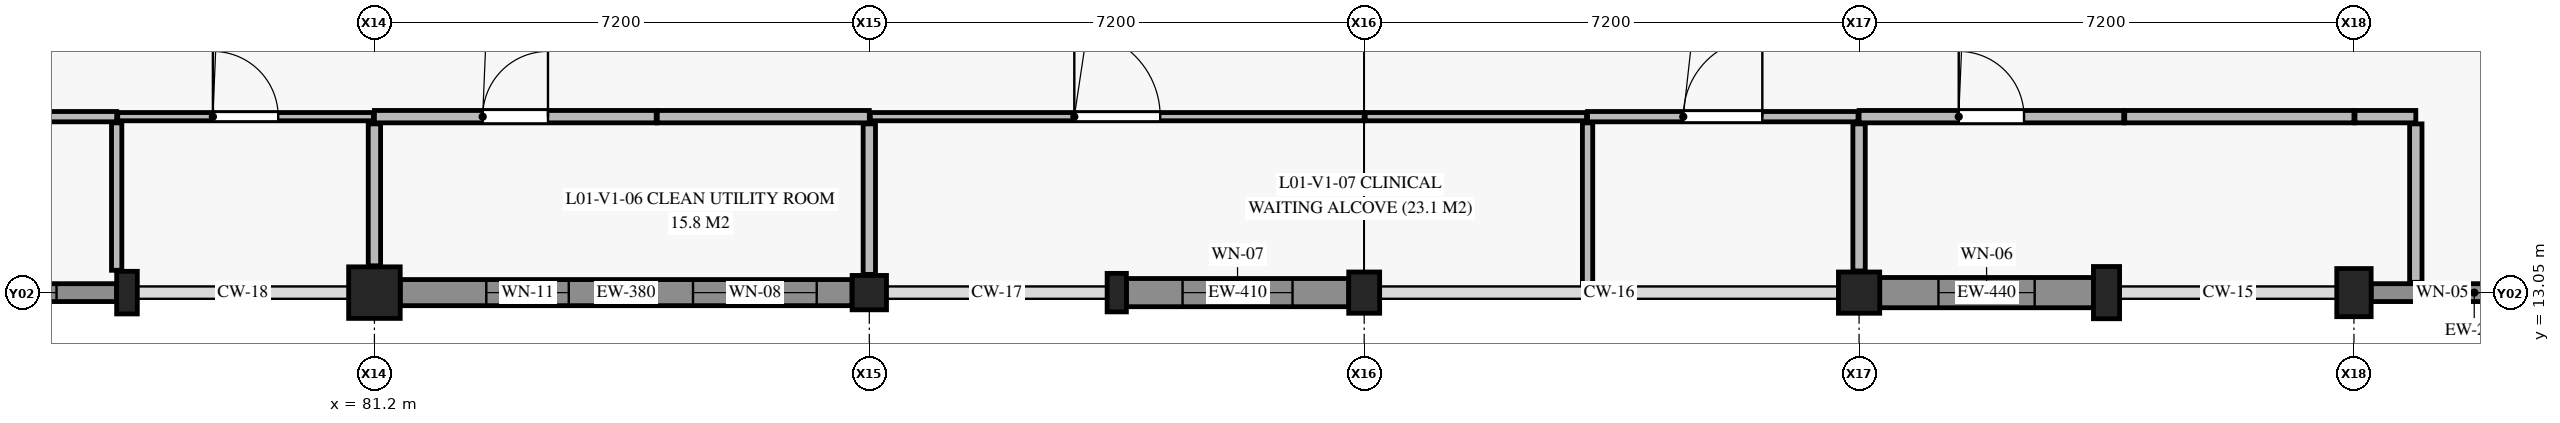
"""IFC4 building model, lengths in metres.
Left out: names, types, materials, properties, quantities, classifications, styles, units other than length and angle.
Written with IfcOpenShell. Run it as: python <this file> out.ifc"""

import sys

from ifc_helpers import new_model, si_unit, direction, frame, frame_2d, origin, origin_2d, place, context, subcontext, project, spatial, rectangle, extrude, element, fill, save


model = new_model("IFC4")
c1 = context("Model", 3, precision=1e-05, world=origin(), true_north=direction((0.0, 1.0)))
c2 = subcontext(c1, "Body", "Model", "MODEL_VIEW")
j1 = project(units=[si_unit("LENGTHUNIT", "METRE"), si_unit("PLANEANGLEUNIT", "RADIAN")], contexts=[c1])
p1 = place(None, origin())
s1 = spatial("IfcSite", under=j1, at=p1, CompositionType="ELEMENT")
p2 = place(p1, origin())
s2 = spatial("IfcBuilding", under=s1, at=p2, CompositionType="ELEMENT")
p3 = place(p2, frame((0.0, 0.0, 4.8)))
s3 = spatial("IfcBuildingStorey", under=s2, at=p3, CompositionType="ELEMENT", Elevation=4.8)
p4 = place(p3, frame((81.2, 13.05, 0.0), z_axis=(0.0, 0.0, 1.0), x_axis=(1.0, 0.0, 0.0)))
e1 = element("IfcColumn", 1, at=p4, inside=s3, PredefinedType="COLUMN", context=c2, shape_type="SweptSolid", body=[
    extrude(rectangle(XDim=0.75, YDim=0.75, at=origin_2d()), origin(), (0.0, 0.0, 1.0), 4.36),
])
p5 = place(p3, frame((88.4, 13.05, 0.0), z_axis=(0.0, 0.0, 1.0), x_axis=(1.0, 0.0, 0.0)))
e2 = element("IfcColumn", 2, at=p5, inside=s3, PredefinedType="COLUMN", context=c2, shape_type="SweptSolid", body=[
    extrude(rectangle(XDim=0.5, YDim=0.5, at=origin_2d()), origin(), (0.0, 0.0, 1.0), 4.36),
])
p6 = place(p3, frame((95.6, 13.05, 0.0), z_axis=(0.0, 0.0, 1.0), x_axis=(1.0, 0.0, 0.0)))
e3 = element("IfcColumn", 3, at=p6, inside=s3, PredefinedType="COLUMN", context=c2, shape_type="SweptSolid", body=[
    extrude(rectangle(XDim=0.45, YDim=0.6, at=origin_2d()), origin(), (0.0, 0.0, 1.0), 4.36),
])
p7 = place(p3, frame((102.8, 13.05, 0.0), z_axis=(0.0, 0.0, 1.0), x_axis=(1.0, 0.0, 0.0)))
e4 = element("IfcColumn", 4, at=p7, inside=s3, PredefinedType="COLUMN", context=c2, shape_type="SweptSolid", body=[
    extrude(rectangle(XDim=0.6, YDim=0.6, at=origin_2d()), origin(), (0.0, 0.0, 1.0), 4.36),
])
p8 = place(p3, frame((110.0, 13.05, 0.0), z_axis=(0.0, 0.0, 1.0), x_axis=(1.0, 0.0, 0.0)))
e5 = element("IfcColumn", 5, at=p8, inside=s3, PredefinedType="COLUMN", context=c2, shape_type="SweptSolid", body=[
    extrude(rectangle(XDim=0.5, YDim=0.7, at=origin_2d()), origin(), (0.0, 0.0, 1.0), 4.36),
])
p9 = place(p3, frame((77.6, 13.05, 0.0), z_axis=(0.0, 0.0, 1.0), x_axis=(1.0, 0.0, 0.0)))
e6 = element("IfcColumn", 6, at=p9, inside=s3, PredefinedType="PILASTER", context=c2, shape_type="SweptSolid", body=[
    extrude(rectangle(XDim=0.3, YDim=0.62, at=origin_2d()), origin(), (0.0, 0.0, 1.0), 4.2),
])
p10 = place(p3, frame((92.0, 13.05, 0.0), z_axis=(0.0, 0.0, 1.0), x_axis=(1.0, 0.0, 0.0)))
e7 = element("IfcColumn", 7, at=p10, inside=s3, PredefinedType="PILASTER", context=c2, shape_type="SweptSolid", body=[
    extrude(rectangle(XDim=0.28, YDim=0.56, at=origin_2d()), origin(), (0.0, 0.0, 1.0), 4.2),
])
p11 = place(p3, frame((106.4, 13.05, 0.0), z_axis=(0.0, 0.0, 1.0), x_axis=(1.0, 0.0, 0.0)))
e8 = element("IfcColumn", 8, at=p11, inside=s3, PredefinedType="PILASTER", context=c2, shape_type="SweptSolid", body=[
    extrude(rectangle(XDim=0.38, YDim=0.76, at=origin_2d()), origin(), (0.0, 0.0, 1.0), 4.2),
])
p12 = place(p3, frame((113.25, 13.05, 0.0), z_axis=(0.0, 0.0, 1.0), x_axis=(-1.0, 0.0, 0.0)))
e9 = element("IfcWall", 9, at=p12, inside=s3, PredefinedType="SOLIDWALL", context=c2, shape_type="SweptSolid", body=[
    extrude(rectangle(XDim=3.0, YDim=0.26, at=frame_2d((1.5, 0.0))), origin(), (0.0, 0.0, 1.0), 3.38),
])
p13 = place(p12, frame((0.565, 0.0, 0.9)))
e10 = element("IfcOpeningElement", 10, at=p13, cuts=e9, PredefinedType="OPENING", context=c2, shape_type="SweptSolid", body=[
    extrude(rectangle(XDim=1.2, YDim=1.8, at=frame_2d((0.6, 0.9))), frame((0.0, 0.14, 0.0), z_axis=(0.0, -1.0, 0.0), x_axis=(1.0, 0.0, 0.0)), (0.0, 0.0, 1.0), 0.28),
])
p14 = place(p3, frame((106.21, 13.05, 0.0), z_axis=(0.0, 0.0, 1.0), x_axis=(-1.0, 0.0, 0.0)))
e11 = element("IfcWall", 11, at=p14, inside=s3, PredefinedType="USERDEFINED", context=c2, shape_type="SweptSolid", body=[
    extrude(rectangle(XDim=3.11, YDim=0.44, at=frame_2d((1.555, 0.0))), origin(), (0.0, 0.0, 1.0), 3.38),
])
p15 = place(p14, frame((0.855, 0.0, 0.9)))
e12 = element("IfcOpeningElement", 12, at=p15, cuts=e11, PredefinedType="OPENING", context=c2, shape_type="SweptSolid", body=[
    extrude(rectangle(XDim=1.4, YDim=1.8, at=frame_2d((0.7, 0.9))), frame((0.0, 0.23, 0.0), z_axis=(0.0, -1.0, 0.0), x_axis=(1.0, 0.0, 0.0)), (0.0, 0.0, 1.0), 0.46),
])
p16 = place(p3, frame((95.375, 13.05, 0.0), z_axis=(0.0, 0.0, 1.0), x_axis=(-1.0, 0.0, 0.0)))
e13 = element("IfcWall", 13, at=p16, inside=s3, PredefinedType="USERDEFINED", context=c2, shape_type="SweptSolid", body=[
    extrude(rectangle(XDim=3.235, YDim=0.41, at=frame_2d((1.618, 0.0))), origin(), (0.0, 0.0, 1.0), 3.3),
])
p17 = place(p16, frame((0.817, 0.0, 0.9)))
e14 = element("IfcOpeningElement", 14, at=p17, cuts=e13, PredefinedType="OPENING", context=c2, shape_type="SweptSolid", body=[
    extrude(rectangle(XDim=1.6, YDim=1.8, at=frame_2d((0.8, 0.9))), frame((0.0, 0.215, 0.0), z_axis=(0.0, -1.0, 0.0), x_axis=(1.0, 0.0, 0.0)), (0.0, 0.0, 1.0), 0.43),
])
p18 = place(p3, frame((88.15, 13.05, 0.0), z_axis=(0.0, 0.0, 1.0), x_axis=(-1.0, 0.0, 0.0)))
e15 = element("IfcWall", 15, at=p18, inside=s3, PredefinedType="USERDEFINED", context=c2, shape_type="SweptSolid", body=[
    extrude(rectangle(XDim=6.575, YDim=0.38, at=frame_2d((3.288, 0.0))), origin(), (0.0, 0.0, 1.0), 3.38),
])
p19 = place(p18, frame((0.515, 0.0, 0.9)))
e16 = element("IfcOpeningElement", 16, at=p19, cuts=e15, PredefinedType="OPENING", context=c2, shape_type="SweptSolid", body=[
    extrude(rectangle(XDim=1.8, YDim=1.8, at=frame_2d((0.9, 0.9))), frame((0.0, 0.2, 0.0), z_axis=(0.0, -1.0, 0.0), x_axis=(1.0, 0.0, 0.0)), (0.0, 0.0, 1.0), 0.4),
])
p20 = place(p18, frame((4.123, 0.0, 0.9)))
e17 = element("IfcOpeningElement", 17, at=p20, cuts=e15, PredefinedType="OPENING", context=c2, shape_type="SweptSolid", body=[
    extrude(rectangle(XDim=1.2, YDim=1.5, at=frame_2d((0.6, 0.75))), frame((0.0, 0.2, 0.0), z_axis=(0.0, -1.0, 0.0), x_axis=(1.0, 0.0, 0.0)), (0.0, 0.0, 1.0), 0.4),
])
p21 = place(p3, frame((77.45, 13.05, 0.0), z_axis=(0.0, 0.0, 1.0), x_axis=(-1.0, 0.0, 0.0)))
e18 = element("IfcWall", 18, at=p21, inside=s3, PredefinedType="SOLIDWALL", context=c2, shape_type="SweptSolid", body=[
    extrude(rectangle(XDim=3.25, YDim=0.26, at=frame_2d((1.625, 0.0))), origin(), (0.0, 0.0, 1.0), 3.38),
])
p22 = place(p21, frame((0.875, 0.0, 0.9)))
e19 = element("IfcOpeningElement", 19, at=p22, cuts=e18, PredefinedType="OPENING", context=c2, shape_type="SweptSolid", body=[
    extrude(rectangle(XDim=1.5, YDim=1.5, at=frame_2d((0.75, 0.75))), frame((0.0, 0.14, 0.0), z_axis=(0.0, -1.0, 0.0), x_axis=(1.0, 0.0, 0.0)), (0.0, 0.0, 1.0), 0.28),
])
p23 = place(p3, frame((81.2, 15.61, 0.0), z_axis=(0.0, 0.0, 1.0), x_axis=(1.0, 0.0, 0.0)))
e20 = element("IfcWall", 20, at=p23, inside=s3, PredefinedType="PLUMBINGWALL", context=c2, shape_type="SweptSolid", body=[
    extrude(rectangle(XDim=4.1, YDim=0.18, at=frame_2d((2.05, 0.0))), origin(), (0.0, 0.0, 1.0), 3.95),
])
p24 = place(p23, frame((1.575, 0.0, 0.0)))
e21 = element("IfcOpeningElement", 21, at=p24, cuts=e20, PredefinedType="OPENING", context=c2, shape_type="SweptSolid", body=[
    extrude(rectangle(XDim=0.95, YDim=2.1, at=frame_2d((0.475, 1.05))), frame((0.0, 0.1, 0.0), z_axis=(0.0, -1.0, 0.0), x_axis=(1.0, 0.0, 0.0)), (0.0, 0.0, 1.0), 0.2),
])
p25 = place(p3, frame((85.315, 15.61, 0.0), z_axis=(0.0, 0.0, 1.0), x_axis=(1.0, 0.0, 0.0)))
e22 = element("IfcWall", 22, at=p25, inside=s3, PredefinedType="PLUMBINGWALL", context=c2, shape_type="SweptSolid", body=[
    extrude(rectangle(XDim=3.085, YDim=0.18, at=frame_2d((1.542, 0.0))), origin(), (0.0, 0.0, 1.0), 3.95),
])
p26 = place(p3, frame((102.8, 15.61, 0.0), z_axis=(0.0, 0.0, 1.0), x_axis=(1.0, 0.0, 0.0)))
e23 = element("IfcWall", 23, at=p26, inside=s3, PredefinedType="PLUMBINGWALL", context=c2, shape_type="SweptSolid", body=[
    extrude(rectangle(XDim=3.85, YDim=0.18, at=frame_2d((1.925, 0.0))), origin(), (0.0, 0.0, 1.0), 3.95),
])
p27 = place(p26, frame((1.45, 0.0, 0.0)))
e24 = element("IfcOpeningElement", 24, at=p27, cuts=e23, PredefinedType="OPENING", context=c2, shape_type="SweptSolid", body=[
    extrude(rectangle(XDim=0.95, YDim=2.1, at=frame_2d((0.475, 1.05))), frame((0.0, 0.1, 0.0), z_axis=(0.0, -1.0, 0.0), x_axis=(1.0, 0.0, 0.0)), (0.0, 0.0, 1.0), 0.2),
])
p28 = place(p3, frame((106.665, 15.61, 0.0), z_axis=(0.0, 0.0, 1.0), x_axis=(1.0, 0.0, 0.0)))
e25 = element("IfcWall", 25, at=p28, inside=s3, PredefinedType="PLUMBINGWALL", context=c2, shape_type="SweptSolid", body=[
    extrude(rectangle(XDim=3.335, YDim=0.18, at=frame_2d((1.667, 0.0))), origin(), (0.0, 0.0, 1.0), 3.95),
])
p29 = place(p3, frame((110.015, 15.61, 0.0), z_axis=(0.0, 0.0, 1.0), x_axis=(1.0, 0.0, 0.0)))
e26 = element("IfcWall", 26, at=p29, inside=s3, PredefinedType="PLUMBINGWALL", context=c2, shape_type="SweptSolid", body=[
    extrude(rectangle(XDim=0.885, YDim=0.18, at=frame_2d((0.442, 0.0))), origin(), (0.0, 0.0, 1.0), 3.95),
])
p30 = place(p3, frame((110.9, 13.2, 0.0), z_axis=(0.0, 0.0, 1.0), x_axis=(0.0, 1.0, 0.0)))
e27 = element("IfcWall", 27, at=p30, inside=s3, PredefinedType="PLUMBINGWALL", context=c2, shape_type="SweptSolid", body=[
    extrude(rectangle(XDim=2.305, YDim=0.18, at=frame_2d((1.152, 0.0))), origin(), (0.0, 0.0, 1.0), 3.95),
])
p31 = place(p3, frame((74.015, 15.61, 0.0), z_axis=(0.0, 0.0, 1.0), x_axis=(1.0, 0.0, 0.0)))
e28 = element("IfcWall", 28, at=p31, inside=s3, PredefinedType="PARTITIONING", context=c2, shape_type="SweptSolid", body=[
    extrude(rectangle(XDim=3.435, YDim=0.15, at=frame_2d((1.718, 0.0))), origin(), (0.0, 0.0, 1.0), 3.95),
])
p32 = place(p3, frame((98.85, 15.61, 0.0), z_axis=(0.0, 0.0, 1.0), x_axis=(1.0, 0.0, 0.0)))
e29 = element("IfcWall", 29, at=p32, inside=s3, PredefinedType="PARTITIONING", context=c2, shape_type="SweptSolid", body=[
    extrude(rectangle(XDim=3.935, YDim=0.15, at=frame_2d((1.967, 0.0))), origin(), (0.0, 0.0, 1.0), 3.95),
])
p33 = place(p32, frame((1.393, 0.0, 0.0)))
e30 = element("IfcOpeningElement", 30, at=p33, cuts=e29, PredefinedType="OPENING", context=c2, shape_type="SweptSolid", body=[
    extrude(rectangle(XDim=1.15, YDim=2.15, at=frame_2d((0.575, 1.075))), frame((0.0, 0.085, 0.0), z_axis=(0.0, -1.0, 0.0), x_axis=(1.0, 0.0, 0.0)), (0.0, 0.0, 1.0), 0.17),
])
p34 = place(p3, frame((77.465, 15.61, 0.0), z_axis=(0.0, 0.0, 1.0), x_axis=(1.0, 0.0, 0.0)))
e31 = element("IfcWall", 31, at=p34, inside=s3, PredefinedType="PARTITIONING", context=c2, shape_type="SweptSolid", body=[
    extrude(rectangle(XDim=3.72, YDim=0.12, at=frame_2d((1.86, 0.0))), origin(), (0.0, 0.0, 1.0), 3.95),
])
p35 = place(p34, frame((1.385, 0.0, 0.0)))
e32 = element("IfcOpeningElement", 32, at=p35, cuts=e31, PredefinedType="OPENING", context=c2, shape_type="SweptSolid", body=[
    extrude(rectangle(XDim=0.95, YDim=2.1, at=frame_2d((0.475, 1.05))), frame((0.0, 0.07, 0.0), z_axis=(0.0, -1.0, 0.0), x_axis=(1.0, 0.0, 0.0)), (0.0, 0.0, 1.0), 0.14),
])
p36 = place(p3, frame((88.415, 15.61, 0.0), z_axis=(0.0, 0.0, 1.0), x_axis=(1.0, 0.0, 0.0)))
e33 = element("IfcWall", 33, at=p36, inside=s3, PredefinedType="PARTITIONING", context=c2, shape_type="SweptSolid", body=[
    extrude(rectangle(XDim=7.185, YDim=0.12, at=frame_2d((3.593, 0.0))), origin(), (0.0, 0.0, 1.0), 3.95),
])
p37 = place(p36, frame((2.968, 0.0, 0.0)))
e34 = element("IfcOpeningElement", 34, at=p37, cuts=e33, PredefinedType="OPENING", context=c2, shape_type="SweptSolid", body=[
    extrude(rectangle(XDim=1.25, YDim=2.15, at=frame_2d((0.625, 1.075))), frame((0.0, 0.07, 0.0), z_axis=(0.0, -1.0, 0.0), x_axis=(1.0, 0.0, 0.0)), (0.0, 0.0, 1.0), 0.14),
])
p38 = place(p3, frame((95.615, 15.61, 0.0), z_axis=(0.0, 0.0, 1.0), x_axis=(1.0, 0.0, 0.0)))
e35 = element("IfcWall", 35, at=p38, inside=s3, PredefinedType="PARTITIONING", context=c2, shape_type="SweptSolid", body=[
    extrude(rectangle(XDim=3.22, YDim=0.12, at=frame_2d((1.61, 0.0))), origin(), (0.0, 0.0, 1.0), 3.95),
])
p39 = place(p3, frame((81.2, 13.44, 0.0), z_axis=(0.0, 0.0, 1.0), x_axis=(0.0, 1.0, 0.0)))
e36 = element("IfcWall", 36, at=p39, inside=s3, PredefinedType="PLUMBINGWALL", context=c2, shape_type="SweptSolid", body=[
    extrude(rectangle(XDim=2.065, YDim=0.18, at=frame_2d((1.032, 0.0))), origin(), (0.0, 0.0, 1.0), 3.95),
])
p40 = place(p3, frame((88.4, 13.315, 0.0), z_axis=(0.0, 0.0, 1.0), x_axis=(0.0, 1.0, 0.0)))
e37 = element("IfcWall", 37, at=p40, inside=s3, PredefinedType="PLUMBINGWALL", context=c2, shape_type="SweptSolid", body=[
    extrude(rectangle(XDim=2.19, YDim=0.18, at=frame_2d((1.095, 0.0))), origin(), (0.0, 0.0, 1.0), 3.95),
])
p41 = place(p3, frame((102.8, 13.365, 0.0), z_axis=(0.0, 0.0, 1.0), x_axis=(0.0, 1.0, 0.0)))
e38 = element("IfcWall", 38, at=p41, inside=s3, PredefinedType="PLUMBINGWALL", context=c2, shape_type="SweptSolid", body=[
    extrude(rectangle(XDim=2.14, YDim=0.18, at=frame_2d((1.07, 0.0))), origin(), (0.0, 0.0, 1.0), 3.95),
])
p42 = place(p3, frame((77.45, 13.375, 0.0), z_axis=(0.0, 0.0, 1.0), x_axis=(0.0, 1.0, 0.0)))
e39 = element("IfcWall", 39, at=p42, inside=s3, PredefinedType="PARTITIONING", context=c2, shape_type="SweptSolid", body=[
    extrude(rectangle(XDim=2.145, YDim=0.15, at=frame_2d((1.073, 0.0))), origin(), (0.0, 0.0, 1.0), 3.95),
])
p43 = place(p3, frame((98.85, 13.155, 0.0), z_axis=(0.0, 0.0, 1.0), x_axis=(0.0, 1.0, 0.0)))
e40 = element("IfcWall", 40, at=p43, inside=s3, PredefinedType="PARTITIONING", context=c2, shape_type="SweptSolid", body=[
    extrude(rectangle(XDim=2.365, YDim=0.15, at=frame_2d((1.183, 0.0))), origin(), (0.0, 0.0, 1.0), 3.95),
])
p44 = place(p13, origin())
e41 = element("IfcWindow", 41, at=p44, inside=s3, PartitioningType="SINGLE_PANEL", PredefinedType="WINDOW", context=c2, shape_type="SweptSolid", body=[
    extrude(rectangle(XDim=1.2, YDim=1.8, at=frame_2d((0.6, 0.9))), frame((0.0, 0.03, 0.0), z_axis=(0.0, -1.0, 0.0), x_axis=(1.0, 0.0, 0.0)), (0.0, 0.0, 1.0), 0.06),
])
fill(e10, e41)
p45 = place(p15, origin())
e42 = element("IfcWindow", 42, at=p45, inside=s3, PartitioningType="SINGLE_PANEL", PredefinedType="WINDOW", context=c2, shape_type="SweptSolid", body=[
    extrude(rectangle(XDim=1.4, YDim=1.8, at=frame_2d((0.7, 0.9))), frame((0.0, 0.03, 0.0), z_axis=(0.0, -1.0, 0.0), x_axis=(1.0, 0.0, 0.0)), (0.0, 0.0, 1.0), 0.06),
])
fill(e12, e42)
p46 = place(p17, origin())
e43 = element("IfcWindow", 43, at=p46, inside=s3, PartitioningType="SINGLE_PANEL", PredefinedType="WINDOW", context=c2, shape_type="SweptSolid", body=[
    extrude(rectangle(XDim=1.6, YDim=1.8, at=frame_2d((0.8, 0.9))), frame((0.0, 0.03, 0.0), z_axis=(0.0, -1.0, 0.0), x_axis=(1.0, 0.0, 0.0)), (0.0, 0.0, 1.0), 0.06),
])
fill(e14, e43)
p47 = place(p19, origin())
e44 = element("IfcWindow", 44, at=p47, inside=s3, PartitioningType="SINGLE_PANEL", PredefinedType="WINDOW", context=c2, shape_type="SweptSolid", body=[
    extrude(rectangle(XDim=1.8, YDim=1.8, at=frame_2d((0.9, 0.9))), frame((0.0, 0.03, 0.0), z_axis=(0.0, -1.0, 0.0), x_axis=(1.0, 0.0, 0.0)), (0.0, 0.0, 1.0), 0.06),
])
fill(e16, e44)
p48 = place(p20, origin())
e45 = element("IfcWindow", 45, at=p48, inside=s3, PartitioningType="SINGLE_PANEL", PredefinedType="WINDOW", context=c2, shape_type="SweptSolid", body=[
    extrude(rectangle(XDim=1.2, YDim=1.5, at=frame_2d((0.6, 0.75))), frame((0.0, 0.03, 0.0), z_axis=(0.0, -1.0, 0.0), x_axis=(1.0, 0.0, 0.0)), (0.0, 0.0, 1.0), 0.06),
])
fill(e17, e45)
p49 = place(p22, origin())
e46 = element("IfcWindow", 46, at=p49, inside=s3, PartitioningType="SINGLE_PANEL", PredefinedType="WINDOW", context=c2, shape_type="SweptSolid", body=[
    extrude(rectangle(XDim=1.5, YDim=1.5, at=frame_2d((0.75, 0.75))), frame((0.0, 0.03, 0.0), z_axis=(0.0, -1.0, 0.0), x_axis=(1.0, 0.0, 0.0)), (0.0, 0.0, 1.0), 0.06),
])
fill(e19, e46)
p50 = place(p35, origin())
e47 = element("IfcDoor", 47, at=p50, inside=s3, OperationType="SINGLE_SWING_LEFT", PredefinedType="DOOR", context=c2, shape_type="SweptSolid", body=[
    extrude(rectangle(XDim=0.95, YDim=2.1, at=frame_2d((0.475, 1.05))), frame((0.0, 0.025, 0.0), z_axis=(0.0, -1.0, 0.0), x_axis=(1.0, 0.0, 0.0)), (0.0, 0.0, 1.0), 0.05),
])
fill(e32, e47)
p51 = place(p24, origin())
e48 = element("IfcDoor", 48, at=p51, inside=s3, OperationType="SINGLE_SWING_RIGHT", PredefinedType="DOOR", context=c2, shape_type="SweptSolid", body=[
    extrude(rectangle(XDim=0.95, YDim=2.1, at=frame_2d((0.475, 1.05))), frame((0.0, 0.025, 0.0), z_axis=(0.0, -1.0, 0.0), x_axis=(1.0, 0.0, 0.0)), (0.0, 0.0, 1.0), 0.05),
])
fill(e21, e48)
p52 = place(p37, origin())
e49 = element("IfcDoor", 49, at=p52, inside=s3, OperationType="SINGLE_SWING_LEFT", PredefinedType="DOOR", context=c2, shape_type="SweptSolid", body=[
    extrude(rectangle(XDim=1.25, YDim=2.15, at=frame_2d((0.625, 1.075))), frame((0.0, 0.025, 0.0), z_axis=(0.0, -1.0, 0.0), x_axis=(1.0, 0.0, 0.0)), (0.0, 0.0, 1.0), 0.05),
])
fill(e34, e49)
p53 = place(p33, origin())
e50 = element("IfcDoor", 50, at=p53, inside=s3, OperationType="SINGLE_SWING_RIGHT", PredefinedType="DOOR", context=c2, shape_type="SweptSolid", body=[
    extrude(rectangle(XDim=1.15, YDim=2.15, at=frame_2d((0.575, 1.075))), frame((0.0, 0.025, 0.0), z_axis=(0.0, -1.0, 0.0), x_axis=(1.0, 0.0, 0.0)), (0.0, 0.0, 1.0), 0.05),
])
fill(e30, e50)
p54 = place(p27, origin())
e51 = element("IfcDoor", 51, at=p54, inside=s3, OperationType="SINGLE_SWING_LEFT", PredefinedType="DOOR", context=c2, shape_type="SweptSolid", body=[
    extrude(rectangle(XDim=0.95, YDim=2.1, at=frame_2d((0.475, 1.05))), frame((0.0, 0.025, 0.0), z_axis=(0.0, -1.0, 0.0), x_axis=(1.0, 0.0, 0.0)), (0.0, 0.0, 1.0), 0.05),
])
fill(e24, e51)
save(model, sys.argv[1])
